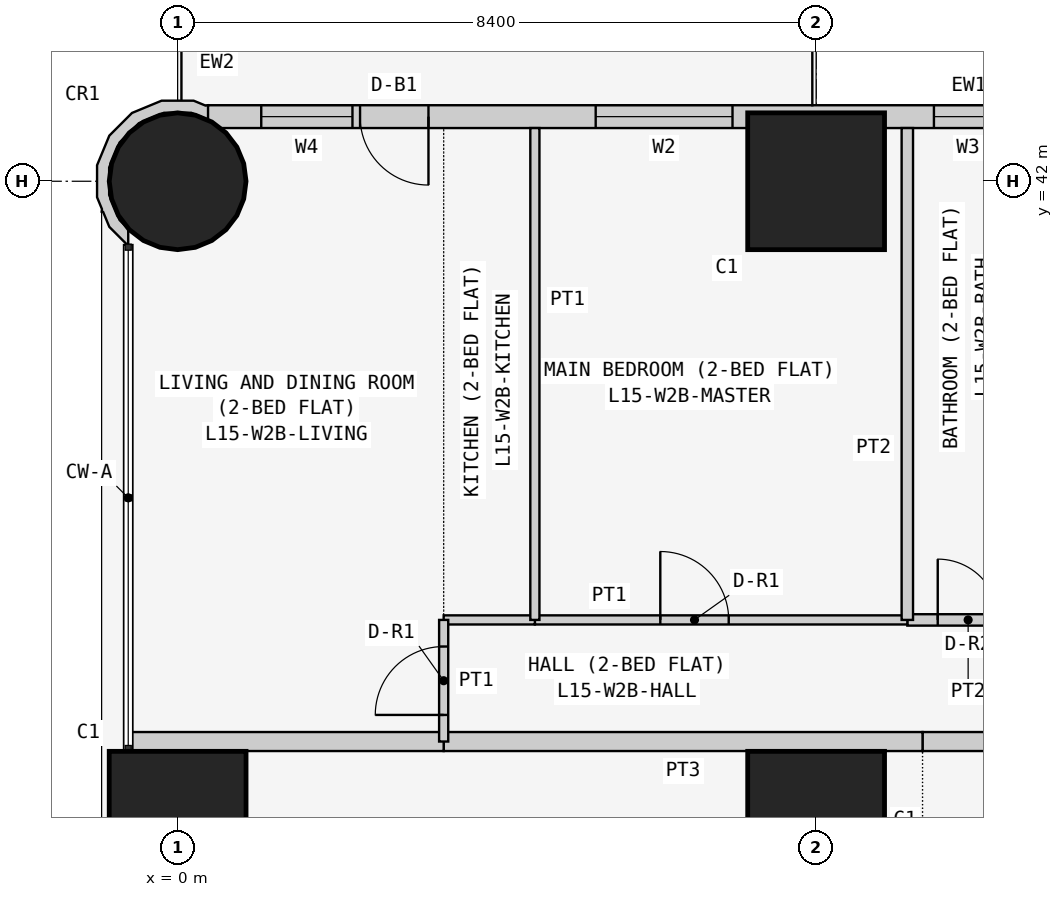
"""IFC4 building model, lengths in metres.
Left out: names, types, materials, properties, quantities, classifications, styles, units other than length and angle.
Written with IfcOpenShell. Run it as: python <this file> out.ifc"""

import sys

from ifc_helpers import new_model, si_unit, direction, frame, frame_2d, origin, origin_2d, place, context, subcontext, project, spatial, polyline, rectangle, circle, outline, extrude, element, fill, save


model = new_model("IFC4")
c1 = context("Model", 3, precision=1e-05, world=origin(), true_north=direction((0.0, 1.0)))
c2 = subcontext(c1, "Body", "Model", "MODEL_VIEW")
j1 = project(units=[si_unit("LENGTHUNIT", "METRE"), si_unit("PLANEANGLEUNIT", "RADIAN")], contexts=[c1])
p1 = place(None, origin())
s1 = spatial("IfcSite", under=j1, at=p1, CompositionType="ELEMENT")
p2 = place(p1, origin())
s2 = spatial("IfcBuilding", under=s1, at=p2, CompositionType="ELEMENT")
p3 = place(p2, frame((0.0, 0.0, 63.3)))
s3 = spatial("IfcBuildingStorey", under=s2, at=p3, CompositionType="ELEMENT", Elevation=63.3)
p4 = place(p3, frame((0.0, 33.6, 0.0), z_axis=(0.0, 0.0, 1.0), x_axis=(1.0, 0.0, 0.0)))
e1 = element("IfcColumn", 1, at=p4, inside=s3, PredefinedType="COLUMN", context=c2, shape_type="SweptSolid", body=[
    extrude(rectangle(XDim=1.8, YDim=1.8, at=origin_2d()), origin(), (0.0, 0.0, 1.0), 3.6),
])
p5 = place(p3, frame((0.0, 42.0, 0.0), z_axis=(0.0, 0.0, 1.0), x_axis=(1.0, 0.0, 0.0)))
e2 = element("IfcColumn", 2, at=p5, inside=s3, PredefinedType="COLUMN", context=c2, shape_type="SweptSolid", body=[
    extrude(circle(Radius=0.9, at=origin_2d()), origin(), (0.0, 0.0, 1.0), 3.6),
])
for number, where, z_axis, x_axis in (
    (3, (8.4, 33.6, 0.0), (0.0, 0.0, 1.0), (1.0, 0.0, 0.0)),
    (4, (8.4, 42.0, 0.0), (0.0, 0.0, 1.0), (1.0, 0.0, 0.0)),
):
    element("IfcColumn", number, at=place(p3, frame(where, z_axis=z_axis, x_axis=x_axis)), inside=s3, PredefinedType="COLUMN", context=c2, shape_type="SweptSolid", body=[
        extrude(rectangle(XDim=1.8, YDim=1.8, at=origin_2d()), origin(), (0.0, 0.0, 1.0), 3.6),
    ])
p6 = place(p3, frame((15.8, 42.85, 0.0), z_axis=(0.0, 0.0, 1.0), x_axis=(-1.0, 0.0, 0.0)))
e5 = element("IfcWall", 5, at=p6, inside=s3, PredefinedType="SOLIDWALL", context=c2, shape_type="SweptSolid", body=[
    extrude(rectangle(XDim=15.4, YDim=0.3, at=frame_2d((7.7, 0.0))), origin(), (0.0, 0.0, 1.0), 3.45),
])
p7 = place(p6, frame((1.2, 0.0, 0.9)))
e6 = element("IfcOpeningElement", 6, at=p7, cuts=e5, PredefinedType="OPENING", context=c2, shape_type="SweptSolid", body=[
    extrude(rectangle(XDim=1.8, YDim=1.5, at=frame_2d((0.9, 0.75))), frame((0.0, 0.16, 0.0), z_axis=(0.0, -1.0, 0.0), x_axis=(1.0, 0.0, 0.0)), (0.0, 0.0, 1.0), 0.32),
])
p8 = place(p6, frame((4.95, 0.0, 1.5)))
e7 = element("IfcOpeningElement", 7, at=p8, cuts=e5, PredefinedType="OPENING", context=c2, shape_type="SweptSolid", body=[
    extrude(rectangle(XDim=0.9, YDim=0.7, at=frame_2d((0.45, 0.35))), frame((0.0, 0.16, 0.0), z_axis=(0.0, -1.0, 0.0), x_axis=(1.0, 0.0, 0.0)), (0.0, 0.0, 1.0), 0.32),
])
p9 = place(p6, frame((8.5, 0.0, 0.9)))
e8 = element("IfcOpeningElement", 8, at=p9, cuts=e5, PredefinedType="OPENING", context=c2, shape_type="SweptSolid", body=[
    extrude(rectangle(XDim=1.8, YDim=1.5, at=frame_2d((0.9, 0.75))), frame((0.0, 0.16, 0.0), z_axis=(0.0, -1.0, 0.0), x_axis=(1.0, 0.0, 0.0)), (0.0, 0.0, 1.0), 0.32),
])
p10 = place(p6, frame((12.5, 0.0, 0.0)))
e9 = element("IfcOpeningElement", 9, at=p10, cuts=e5, PredefinedType="OPENING", context=c2, shape_type="SweptSolid", body=[
    extrude(rectangle(XDim=0.9, YDim=2.4, at=frame_2d((0.45, 1.2))), frame((0.0, 0.16, 0.0), z_axis=(0.0, -1.0, 0.0), x_axis=(1.0, 0.0, 0.0)), (0.0, 0.0, 1.0), 0.32),
])
p11 = place(p6, frame((13.5, 0.0, 0.9)))
e10 = element("IfcOpeningElement", 10, at=p11, cuts=e5, PredefinedType="OPENING", context=c2, shape_type="SweptSolid", body=[
    extrude(rectangle(XDim=1.2, YDim=1.5, at=frame_2d((0.6, 0.75))), frame((0.0, 0.16, 0.0), z_axis=(0.0, -1.0, 0.0), x_axis=(1.0, 0.0, 0.0)), (0.0, 0.0, 1.0), 0.32),
])
p12 = place(p3, frame((0.364, 42.91, 0.0), z_axis=(0.0, 0.0, 1.0), x_axis=(-0.926129809145, 0.377204953059, 0.0)))
e11 = element("IfcWall", 11, at=p12, inside=s3, PredefinedType="SOLIDWALL", context=c2, shape_type="SweptSolid", body=[
    extrude(outline(polyline([(0.36, 1.803), (0.509, 1.741), (0.761, 1.486), (0.896, 1.154), (0.894, 0.795), (0.755, 0.465), (0.5, 0.213), (0.168, 0.078), (-0.1, 0.08), (0.001, -0.097), (0.03, -0.08), (0.199, -0.081), (0.589, 0.078), (0.889, 0.374), (1.053, 0.763), (1.055, 1.185), (0.896, 1.575), (0.778, 1.695), (0.769, 1.728), (0.75, 1.723), (0.6, 1.875), (0.295, 2.003), (0.281, 1.998), (0.36, 1.803)])), origin(), (0.0, 0.0, 1.0), 3.45),
])
p13 = place(p3, frame((9.8, 34.629, 0.0), z_axis=(0.0, 0.0, 1.0), x_axis=(1.0, 0.0, 0.0)))
e12 = element("IfcWall", 12, at=p13, inside=s3, PredefinedType="PARTITIONING", context=c2, shape_type="SweptSolid", body=[
    extrude(rectangle(XDim=3.6, YDim=0.25, at=frame_2d((1.8, 0.0))), origin(), (0.0, 0.0, 1.0), 3.45),
])
p14 = place(p3, frame((3.5, 34.629, 0.0), z_axis=(0.0, 0.0, 1.0), x_axis=(1.0, 0.0, 0.0)))
e13 = element("IfcWall", 13, at=p14, inside=s3, PredefinedType="PARTITIONING", context=c2, shape_type="SweptSolid", body=[
    extrude(rectangle(XDim=6.3, YDim=0.25, at=frame_2d((3.15, 0.0))), origin(), (0.0, 0.0, 1.0), 3.45),
])
p15 = place(p3, frame((-0.65, 34.629, 0.0), z_axis=(0.0, 0.0, 1.0), x_axis=(1.0, 0.0, 0.0)))
e14 = element("IfcWall", 14, at=p15, inside=s3, PredefinedType="PARTITIONING", context=c2, shape_type="SweptSolid", body=[
    extrude(rectangle(XDim=4.15, YDim=0.25, at=frame_2d((2.075, 0.0))), origin(), (0.0, 0.0, 1.0), 3.45),
])
p16 = place(p3, frame((9.6, 36.229, 0.0), z_axis=(0.0, 0.0, 1.0), x_axis=(1.0, 0.0, 0.0)))
e15 = element("IfcWall", 15, at=p16, inside=s3, PredefinedType="PARTITIONING", context=c2, shape_type="SweptSolid", body=[
    extrude(rectangle(XDim=1.6, YDim=0.15, at=frame_2d((0.8, 0.0))), origin(), (0.0, 0.0, 1.0), 3.45),
])
p17 = place(p16, frame((0.4, 0.0, 0.0)))
e16 = element("IfcOpeningElement", 16, at=p17, cuts=e15, PredefinedType="OPENING", context=c2, shape_type="SweptSolid", body=[
    extrude(rectangle(XDim=0.8, YDim=2.1, at=frame_2d((0.4, 1.05))), frame((0.0, 0.085, 0.0), z_axis=(0.0, -1.0, 0.0), x_axis=(1.0, 0.0, 0.0)), (0.0, 0.0, 1.0), 0.17),
])
p18 = place(p3, frame((4.7, 36.229, 0.0), z_axis=(0.0, 0.0, 1.0), x_axis=(1.0, 0.0, 0.0)))
e17 = element("IfcWall", 17, at=p18, inside=s3, PredefinedType="PARTITIONING", context=c2, shape_type="SweptSolid", body=[
    extrude(rectangle(XDim=4.9, YDim=0.12, at=frame_2d((2.45, 0.0))), origin(), (0.0, 0.0, 1.0), 3.45),
])
p19 = place(p18, frame((1.65, 0.0, 0.0)))
e18 = element("IfcOpeningElement", 18, at=p19, cuts=e17, PredefinedType="OPENING", context=c2, shape_type="SweptSolid", body=[
    extrude(rectangle(XDim=0.9, YDim=2.1, at=frame_2d((0.45, 1.05))), frame((0.0, 0.07, 0.0), z_axis=(0.0, -1.0, 0.0), x_axis=(1.0, 0.0, 0.0)), (0.0, 0.0, 1.0), 0.14),
])
p20 = place(p3, frame((3.5, 36.229, 0.0), z_axis=(0.0, 0.0, 1.0), x_axis=(1.0, 0.0, 0.0)))
e19 = element("IfcWall", 19, at=p20, inside=s3, PredefinedType="PARTITIONING", context=c2, shape_type="SweptSolid", body=[
    extrude(rectangle(XDim=1.2, YDim=0.12, at=frame_2d((0.6, 0.0))), origin(), (0.0, 0.0, 1.0), 3.45),
])
p21 = place(p3, frame((3.5, 34.629, 0.0), z_axis=(0.0, 0.0, 1.0), x_axis=(0.0, 1.0, 0.0)))
e20 = element("IfcWall", 20, at=p21, inside=s3, PredefinedType="PARTITIONING", context=c2, shape_type="SweptSolid", body=[
    extrude(rectangle(XDim=1.6, YDim=0.12, at=frame_2d((0.8, 0.0))), origin(), (0.0, 0.0, 1.0), 3.45),
])
p22 = place(p21, frame((0.35, 0.0, 0.0)))
e21 = element("IfcOpeningElement", 21, at=p22, cuts=e20, PredefinedType="OPENING", context=c2, shape_type="SweptSolid", body=[
    extrude(rectangle(XDim=0.9, YDim=2.1, at=frame_2d((0.45, 1.05))), frame((0.0, 0.07, 0.0), z_axis=(0.0, -1.0, 0.0), x_axis=(1.0, 0.0, 0.0)), (0.0, 0.0, 1.0), 0.14),
])
p23 = place(p3, frame((9.6, 36.229, 0.0), z_axis=(0.0, 0.0, 1.0), x_axis=(0.0, 1.0, 0.0)))
e22 = element("IfcWall", 22, at=p23, inside=s3, PredefinedType="PARTITIONING", context=c2, shape_type="SweptSolid", body=[
    extrude(rectangle(XDim=6.471, YDim=0.15, at=frame_2d((3.235, 0.0))), origin(), (0.0, 0.0, 1.0), 3.45),
])
p24 = place(p3, frame((4.7, 36.229, 0.0), z_axis=(0.0, 0.0, 1.0), x_axis=(0.0, 1.0, 0.0)))
e23 = element("IfcWall", 23, at=p24, inside=s3, PredefinedType="PARTITIONING", context=c2, shape_type="SweptSolid", body=[
    extrude(rectangle(XDim=6.471, YDim=0.12, at=frame_2d((3.235, 0.0))), origin(), (0.0, 0.0, 1.0), 3.45),
])
p25 = place(p8, origin())
e24 = element("IfcWindow", 24, at=p25, inside=s3, PartitioningType="SINGLE_PANEL", PredefinedType="WINDOW", context=c2, shape_type="SweptSolid", body=[
    extrude(rectangle(XDim=0.9, YDim=0.7, at=frame_2d((0.45, 0.35))), frame((0.0, 0.03, 0.0), z_axis=(0.0, -1.0, 0.0), x_axis=(1.0, 0.0, 0.0)), (0.0, 0.0, 1.0), 0.06),
])
fill(e7, e24)
p26 = place(p9, origin())
e25 = element("IfcWindow", 25, at=p26, inside=s3, PartitioningType="SINGLE_PANEL", PredefinedType="WINDOW", context=c2, shape_type="SweptSolid", body=[
    extrude(rectangle(XDim=1.8, YDim=1.5, at=frame_2d((0.9, 0.75))), frame((0.0, 0.03, 0.0), z_axis=(0.0, -1.0, 0.0), x_axis=(1.0, 0.0, 0.0)), (0.0, 0.0, 1.0), 0.06),
])
fill(e8, e25)
p27 = place(p10, origin())
e26 = element("IfcDoor", 26, at=p27, inside=s3, OperationType="SINGLE_SWING_LEFT", PredefinedType="DOOR", context=c2, shape_type="SweptSolid", body=[
    extrude(rectangle(XDim=0.9, YDim=2.4, at=frame_2d((0.45, 1.2))), frame((0.0, 0.025, 0.0), z_axis=(0.0, -1.0, 0.0), x_axis=(1.0, 0.0, 0.0)), (0.0, 0.0, 1.0), 0.05),
])
fill(e9, e26)
p28 = place(p11, origin())
e27 = element("IfcWindow", 27, at=p28, inside=s3, PartitioningType="SINGLE_PANEL", PredefinedType="WINDOW", context=c2, shape_type="SweptSolid", body=[
    extrude(rectangle(XDim=1.2, YDim=1.5, at=frame_2d((0.6, 0.75))), frame((0.0, 0.03, 0.0), z_axis=(0.0, -1.0, 0.0), x_axis=(1.0, 0.0, 0.0)), (0.0, 0.0, 1.0), 0.06),
])
fill(e10, e27)
p29 = place(p17, origin())
e28 = element("IfcDoor", 28, at=p29, inside=s3, OperationType="SINGLE_SWING_LEFT", PredefinedType="DOOR", context=c2, shape_type="SweptSolid", body=[
    extrude(rectangle(XDim=0.8, YDim=2.1, at=frame_2d((0.4, 1.05))), frame((0.0, 0.025, 0.0), z_axis=(0.0, -1.0, 0.0), x_axis=(1.0, 0.0, 0.0)), (0.0, 0.0, 1.0), 0.05),
])
fill(e16, e28)
p30 = place(p19, origin())
e29 = element("IfcDoor", 29, at=p30, inside=s3, OperationType="SINGLE_SWING_LEFT", PredefinedType="DOOR", context=c2, shape_type="SweptSolid", body=[
    extrude(rectangle(XDim=0.9, YDim=2.1, at=frame_2d((0.45, 1.05))), frame((0.0, 0.025, 0.0), z_axis=(0.0, -1.0, 0.0), x_axis=(1.0, 0.0, 0.0)), (0.0, 0.0, 1.0), 0.05),
])
fill(e18, e29)
p31 = place(p22, origin())
e30 = element("IfcDoor", 30, at=p31, inside=s3, OperationType="SINGLE_SWING_LEFT", PredefinedType="DOOR", context=c2, shape_type="SweptSolid", body=[
    extrude(rectangle(XDim=0.9, YDim=2.1, at=frame_2d((0.45, 1.05))), frame((0.0, 0.025, 0.0), z_axis=(0.0, -1.0, 0.0), x_axis=(1.0, 0.0, 0.0)), (0.0, 0.0, 1.0), 0.05),
])
fill(e21, e30)
save(model, sys.argv[1])
